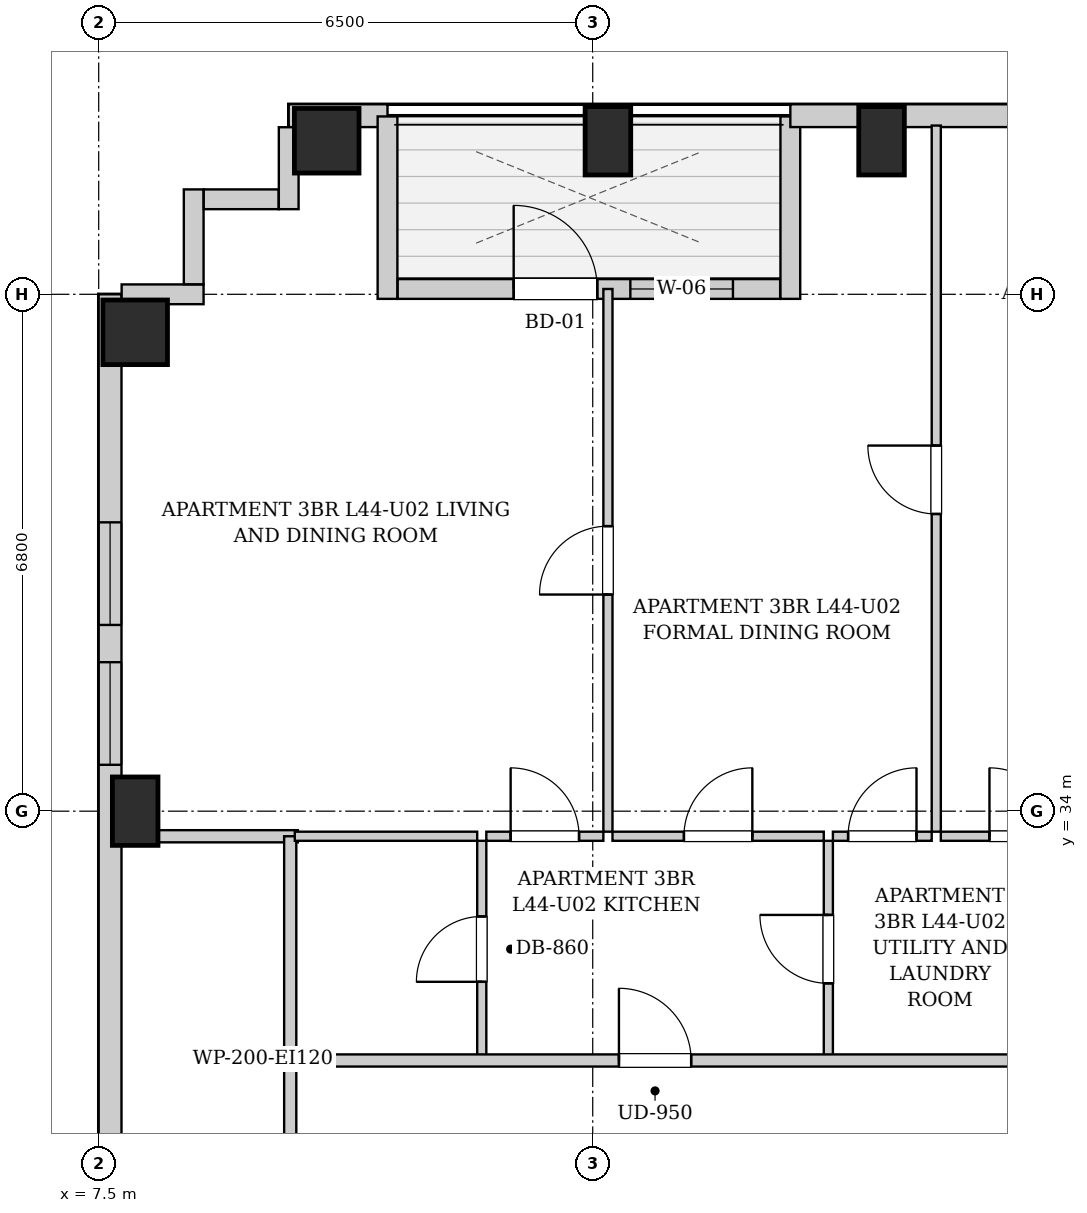
"""IFC4 building model, lengths in metres.
Left out: names, types, materials, properties, quantities, classifications, styles, units other than length and angle.
Written with IfcOpenShell. Run it as: python <this file> out.ifc"""

import sys

from ifc_helpers import new_model, si_unit, direction, frame, frame_2d, origin, origin_2d, place, context, subcontext, project, spatial, rectangle, extrude, element, fill, save


model = new_model("IFC4")
c1 = context("Model", 3, precision=1e-05, world=origin(), true_north=direction((0.0, 1.0)))
c2 = subcontext(c1, "Body", "Model", "MODEL_VIEW")
j1 = project(units=[si_unit("LENGTHUNIT", "METRE"), si_unit("PLANEANGLEUNIT", "RADIAN")], contexts=[c1])
p1 = place(None, origin())
s1 = spatial("IfcSite", under=j1, at=p1, CompositionType="ELEMENT")
p2 = place(p1, origin())
s2 = spatial("IfcBuilding", under=s1, at=p2, CompositionType="ELEMENT")
p3 = place(p2, frame((0.0, 0.0, 153.65)))
s3 = spatial("IfcBuildingStorey", under=s2, at=p3, CompositionType="ELEMENT", Elevation=153.65)
p4 = place(p3, frame((10.5, 42.82, 0.0), z_axis=(0.0, 0.0, 1.0), x_axis=(1.0, 0.0, 0.0)))
e1 = element("IfcColumn", 1, at=p4, inside=s3, PredefinedType="COLUMN", context=c2, shape_type="SweptSolid", body=[
    extrude(rectangle(XDim=0.85, YDim=0.85, at=origin_2d()), origin(), (0.0, 0.0, 1.0), 3.25),
])
for number, where, z_axis, x_axis in (
    (2, (14.2, 42.82, 0.0), (0.0, 0.0, 1.0), (1.0, 0.0, 0.0)),
    (3, (17.8, 42.82, 0.0), (0.0, 0.0, 1.0), (1.0, 0.0, 0.0)),
    (4, (7.98, 34.0, 0.0), (0.0, 0.0, 1.0), (1.0, 0.0, 0.0)),
):
    element("IfcColumn", number, at=place(p3, frame(where, z_axis=z_axis, x_axis=x_axis)), inside=s3, PredefinedType="COLUMN", context=c2, shape_type="SweptSolid", body=[
        extrude(rectangle(XDim=0.6, YDim=0.9, at=origin_2d()), origin(), (0.0, 0.0, 1.0), 3.25),
    ])
p5 = place(p3, frame((7.98, 40.3, 0.0), z_axis=(0.0, 0.0, 1.0), x_axis=(1.0, 0.0, 0.0)))
e5 = element("IfcColumn", 5, at=p5, inside=s3, PredefinedType="COLUMN", context=c2, shape_type="SweptSolid", body=[
    extrude(rectangle(XDim=0.85, YDim=0.85, at=origin_2d()), origin(), (0.0, 0.0, 1.0), 3.25),
])
p6 = place(p3, frame((10.0, 43.15, 0.0), z_axis=(0.0, 0.0, 1.0), x_axis=(1.0, 0.0, 0.0)))
e6 = element("IfcWall", 6, at=p6, inside=s3, PredefinedType="SOLIDWALL", context=c2, shape_type="SweptSolid", body=[
    extrude(rectangle(XDim=1.3, YDim=0.3, at=frame_2d((0.65, 0.0))), origin(), (0.0, 0.0, 1.0), 2.99),
])
p7 = place(p3, frame((11.3, 43.14, 0.0), z_axis=(0.0, 0.0, 1.0), x_axis=(0.0, -1.0, 0.0)))
e7 = element("IfcWall", 7, at=p7, inside=s3, PredefinedType="SOLIDWALL", context=c2, shape_type="SweptSolid", body=[
    extrude(rectangle(XDim=2.4, YDim=0.26, at=frame_2d((1.2, 0.0))), origin(), (0.0, 0.0, 1.0), 2.99),
])
p8 = place(p3, frame((11.434, 40.87, 0.0), z_axis=(0.0, 0.0, 1.0), x_axis=(1.0, 0.0, 0.0)))
e8 = element("IfcWall", 8, at=p8, inside=s3, PredefinedType="SOLIDWALL", context=c2, shape_type="SweptSolid", body=[
    extrude(rectangle(XDim=5.032, YDim=0.26, at=frame_2d((2.516, 0.0))), origin(), (0.0, 0.0, 1.0), 2.99),
])
p9 = place(p8, frame((1.526, 0.0, 0.0)))
e9 = element("IfcOpeningElement", 9, at=p9, cuts=e8, PredefinedType="OPENING", context=c2, shape_type="SweptSolid", body=[
    extrude(rectangle(XDim=1.1, YDim=2.0, at=frame_2d((0.55, 1.0))), frame((0.0, 0.14, 0.0), z_axis=(0.0, -1.0, 0.0), x_axis=(1.0, 0.0, 0.0)), (0.0, 0.0, 1.0), 0.28),
])
p10 = place(p8, frame((3.061, 0.0, 0.85)))
e10 = element("IfcOpeningElement", 10, at=p10, cuts=e8, PredefinedType="OPENING", context=c2, shape_type="SweptSolid", body=[
    extrude(rectangle(XDim=1.35, YDim=1.65, at=frame_2d((0.675, 0.825))), frame((0.0, 0.14, 0.0), z_axis=(0.0, -1.0, 0.0), x_axis=(1.0, 0.0, 0.0)), (0.0, 0.0, 1.0), 0.28),
])
p11 = place(p3, frame((16.6, 40.74, 0.0), z_axis=(0.0, 0.0, 1.0), x_axis=(0.0, 1.0, 0.0)))
e11 = element("IfcWall", 11, at=p11, inside=s3, PredefinedType="SOLIDWALL", context=c2, shape_type="SweptSolid", body=[
    extrude(rectangle(XDim=2.4, YDim=0.26, at=frame_2d((1.2, 0.0))), origin(), (0.0, 0.0, 1.0), 2.99),
])
p12 = place(p3, frame((16.6, 43.15, 0.0), z_axis=(0.0, 0.0, 1.0), x_axis=(1.0, 0.0, 0.0)))
e12 = element("IfcWall", 12, at=p12, inside=s3, PredefinedType="SOLIDWALL", context=c2, shape_type="SweptSolid", body=[
    extrude(rectangle(XDim=13.35, YDim=0.3, at=frame_2d((6.675, 0.0))), origin(), (0.0, 0.0, 1.0), 2.99),
])
p13 = place(p12, frame((3.269, 0.0, 0.55)))
e13 = element("IfcOpeningElement", 13, at=p13, cuts=e12, PredefinedType="OPENING", context=c2, shape_type="SweptSolid", body=[
    extrude(rectangle(XDim=1.35, YDim=1.2, at=frame_2d((0.675, 0.6))), frame((0.0, 0.16, 0.0), z_axis=(0.0, -1.0, 0.0), x_axis=(1.0, 0.0, 0.0)), (0.0, 0.0, 1.0), 0.32),
])
p14 = place(p12, frame((10.93, 0.0, 0.55)))
e14 = element("IfcOpeningElement", 14, at=p14, cuts=e12, PredefinedType="OPENING", context=c2, shape_type="SweptSolid", body=[
    extrude(rectangle(XDim=1.35, YDim=1.2, at=frame_2d((0.675, 0.6))), frame((0.0, 0.16, 0.0), z_axis=(0.0, -1.0, 0.0), x_axis=(1.0, 0.0, 0.0)), (0.0, 0.0, 1.0), 0.32),
])
p15 = place(p3, frame((7.65, 6.3, 0.0), z_axis=(0.0, 0.0, 1.0), x_axis=(0.0, 1.0, 0.0)))
e15 = element("IfcWall", 15, at=p15, inside=s3, PredefinedType="SOLIDWALL", context=c2, shape_type="SweptSolid", body=[
    extrude(rectangle(XDim=34.5, YDim=0.3, at=frame_2d((17.25, 0.0))), origin(), (0.0, 0.0, 1.0), 2.99),
])
p16 = place(p15, frame((1.425, 0.0, 0.55)))
e16 = element("IfcOpeningElement", 16, at=p16, cuts=e15, PredefinedType="OPENING", context=c2, shape_type="SweptSolid", body=[
    extrude(rectangle(XDim=1.35, YDim=1.2, at=frame_2d((0.675, 0.6))), frame((0.0, 0.16, 0.0), z_axis=(0.0, -1.0, 0.0), x_axis=(1.0, 0.0, 0.0)), (0.0, 0.0, 1.0), 0.32),
])
p17 = place(p15, frame((30.15, 0.0, 0.55)))
e17 = element("IfcOpeningElement", 17, at=p17, cuts=e15, PredefinedType="OPENING", context=c2, shape_type="SweptSolid", body=[
    extrude(rectangle(XDim=1.35, YDim=1.2, at=frame_2d((0.675, 0.6))), frame((0.0, 0.16, 0.0), z_axis=(0.0, -1.0, 0.0), x_axis=(1.0, 0.0, 0.0)), (0.0, 0.0, 1.0), 0.32),
])
p18 = place(p15, frame((28.31, 0.0, 0.55)))
e18 = element("IfcOpeningElement", 18, at=p18, cuts=e15, PredefinedType="OPENING", context=c2, shape_type="SweptSolid", body=[
    extrude(rectangle(XDim=1.35, YDim=1.2, at=frame_2d((0.675, 0.6))), frame((0.0, 0.16, 0.0), z_axis=(0.0, -1.0, 0.0), x_axis=(1.0, 0.0, 0.0)), (0.0, 0.0, 1.0), 0.32),
])
p19 = place(p15, frame((10.35, 0.0, 0.55)))
e19 = element("IfcOpeningElement", 19, at=p19, cuts=e15, PredefinedType="OPENING", context=c2, shape_type="SweptSolid", body=[
    extrude(rectangle(XDim=1.35, YDim=1.2, at=frame_2d((0.675, 0.6))), frame((0.0, 0.16, 0.0), z_axis=(0.0, -1.0, 0.0), x_axis=(1.0, 0.0, 0.0)), (0.0, 0.0, 1.0), 0.32),
])
p20 = place(p15, frame((19.725, 0.0, 0.55)))
e20 = element("IfcOpeningElement", 20, at=p20, cuts=e15, PredefinedType="OPENING", context=c2, shape_type="SweptSolid", body=[
    extrude(rectangle(XDim=1.35, YDim=1.2, at=frame_2d((0.675, 0.6))), frame((0.0, 0.16, 0.0), z_axis=(0.0, -1.0, 0.0), x_axis=(1.0, 0.0, 0.0)), (0.0, 0.0, 1.0), 0.32),
])
p21 = place(p3, frame((7.802, 40.8, 0.0), z_axis=(0.0, 0.0, 1.0), x_axis=(1.0, 0.0, 0.0)))
e21 = element("IfcWall", 21, at=p21, inside=s3, PredefinedType="SOLIDWALL", context=c2, shape_type="SweptSolid", body=[
    extrude(rectangle(XDim=1.078, YDim=0.26, at=frame_2d((0.539, 0.0))), origin(), (0.0, 0.0, 1.0), 2.99),
])
p22 = place(p3, frame((8.75, 40.932, 0.0), z_axis=(0.0, 0.0, 1.0), x_axis=(0.0, 1.0, 0.0)))
e22 = element("IfcWall", 22, at=p22, inside=s3, PredefinedType="SOLIDWALL", context=c2, shape_type="SweptSolid", body=[
    extrude(rectangle(XDim=1.248, YDim=0.26, at=frame_2d((0.624, 0.0))), origin(), (0.0, 0.0, 1.0), 2.99),
])
p23 = place(p3, frame((8.882, 42.05, 0.0), z_axis=(0.0, 0.0, 1.0), x_axis=(1.0, 0.0, 0.0)))
e23 = element("IfcWall", 23, at=p23, inside=s3, PredefinedType="SOLIDWALL", context=c2, shape_type="SweptSolid", body=[
    extrude(rectangle(XDim=0.986, YDim=0.26, at=frame_2d((0.493, 0.0))), origin(), (0.0, 0.0, 1.0), 2.99),
])
p24 = place(p3, frame((10.0, 41.92, 0.0), z_axis=(0.0, 0.0, 1.0), x_axis=(0.0, 1.0, 0.0)))
e24 = element("IfcWall", 24, at=p24, inside=s3, PredefinedType="SOLIDWALL", context=c2, shape_type="SweptSolid", body=[
    extrude(rectangle(XDim=1.078, YDim=0.26, at=frame_2d((0.539, 0.0))), origin(), (0.0, 0.0, 1.0), 2.99),
])
p25 = place(p3, frame((10.02, 28.98, 0.0), z_axis=(0.0, 0.0, 1.0), x_axis=(0.0, 1.0, 0.0)))
e25 = element("IfcWall", 25, at=p25, inside=s3, PredefinedType="PARTITIONING", context=c2, shape_type="SweptSolid", body=[
    extrude(rectangle(XDim=1.74, YDim=0.16, at=frame_2d((0.87, 0.0))), origin(), (0.0, 0.0, 1.0), 2.99),
])
p26 = place(p3, frame((7.78, 33.67, 0.0), z_axis=(0.0, 0.0, 1.0), x_axis=(1.0, 0.0, 0.0)))
e26 = element("IfcWall", 26, at=p26, inside=s3, PredefinedType="PARTITIONING", context=c2, shape_type="SweptSolid", body=[
    extrude(rectangle(XDim=2.34, YDim=0.16, at=frame_2d((1.17, 0.0))), origin(), (0.0, 0.0, 1.0), 2.99),
])
p27 = place(p3, frame((10.02, 30.76, 0.0), z_axis=(0.0, 0.0, 1.0), x_axis=(0.0, 1.0, 0.0)))
e27 = element("IfcWall", 27, at=p27, inside=s3, PredefinedType="PARTITIONING", context=c2, shape_type="SweptSolid", body=[
    extrude(rectangle(XDim=2.91, YDim=0.16, at=frame_2d((1.455, 0.0))), origin(), (0.0, 0.0, 1.0), 2.99),
])
p28 = place(p3, frame((12.54, 30.76, 0.0), z_axis=(0.0, 0.0, 1.0), x_axis=(0.0, 1.0, 0.0)))
e28 = element("IfcWall", 28, at=p28, inside=s3, PredefinedType="PARTITIONING", context=c2, shape_type="SweptSolid", body=[
    extrude(rectangle(XDim=2.85, YDim=0.12, at=frame_2d((1.425, 0.0))), origin(), (0.0, 0.0, 1.0), 2.99),
])
p29 = place(p28, frame((0.995, 0.0, 0.0)))
e29 = element("IfcOpeningElement", 29, at=p29, cuts=e28, PredefinedType="OPENING", context=c2, shape_type="SweptSolid", body=[
    extrude(rectangle(XDim=0.86, YDim=2.05, at=frame_2d((0.43, 1.025))), frame((0.0, 0.07, 0.0), z_axis=(0.0, -1.0, 0.0), x_axis=(1.0, 0.0, 0.0)), (0.0, 0.0, 1.0), 0.14),
])
p30 = place(p3, frame((10.08, 33.67, 0.0), z_axis=(0.0, 0.0, 1.0), x_axis=(1.0, 0.0, 0.0)))
e30 = element("IfcWall", 30, at=p30, inside=s3, PredefinedType="PARTITIONING", context=c2, shape_type="SweptSolid", body=[
    extrude(rectangle(XDim=2.4, YDim=0.12, at=frame_2d((1.2, 0.0))), origin(), (0.0, 0.0, 1.0), 2.99),
])
p31 = place(p3, frame((17.1, 30.76, 0.0), z_axis=(0.0, 0.0, 1.0), x_axis=(0.0, 1.0, 0.0)))
e31 = element("IfcWall", 31, at=p31, inside=s3, PredefinedType="PARTITIONING", context=c2, shape_type="SweptSolid", body=[
    extrude(rectangle(XDim=2.85, YDim=0.12, at=frame_2d((1.425, 0.0))), origin(), (0.0, 0.0, 1.0), 2.99),
])
p32 = place(p31, frame((0.975, 0.0, 0.0)))
e32 = element("IfcOpeningElement", 32, at=p32, cuts=e31, PredefinedType="OPENING", context=c2, shape_type="SweptSolid", body=[
    extrude(rectangle(XDim=0.9, YDim=2.05, at=frame_2d((0.45, 1.025))), frame((0.0, 0.07, 0.0), z_axis=(0.0, -1.0, 0.0), x_axis=(1.0, 0.0, 0.0)), (0.0, 0.0, 1.0), 0.14),
])
p33 = place(p3, frame((12.6, 33.67, 0.0), z_axis=(0.0, 0.0, 1.0), x_axis=(1.0, 0.0, 0.0)))
e33 = element("IfcWall", 33, at=p33, inside=s3, PredefinedType="PARTITIONING", context=c2, shape_type="SweptSolid", body=[
    extrude(rectangle(XDim=1.54, YDim=0.12, at=frame_2d((0.77, 0.0))), origin(), (0.0, 0.0, 1.0), 2.99),
])
p34 = place(p33, frame((0.32, 0.0, 0.0)))
e34 = element("IfcOpeningElement", 34, at=p34, cuts=e33, PredefinedType="OPENING", context=c2, shape_type="SweptSolid", body=[
    extrude(rectangle(XDim=0.9, YDim=2.05, at=frame_2d((0.45, 1.025))), frame((0.0, 0.07, 0.0), z_axis=(0.0, -1.0, 0.0), x_axis=(1.0, 0.0, 0.0)), (0.0, 0.0, 1.0), 0.14),
])
p35 = place(p3, frame((14.26, 33.67, 0.0), z_axis=(0.0, 0.0, 1.0), x_axis=(1.0, 0.0, 0.0)))
e35 = element("IfcWall", 35, at=p35, inside=s3, PredefinedType="PARTITIONING", context=c2, shape_type="SweptSolid", body=[
    extrude(rectangle(XDim=2.78, YDim=0.12, at=frame_2d((1.39, 0.0))), origin(), (0.0, 0.0, 1.0), 2.99),
])
p36 = place(p35, frame((0.94, 0.0, 0.0)))
e36 = element("IfcOpeningElement", 36, at=p36, cuts=e35, PredefinedType="OPENING", context=c2, shape_type="SweptSolid", body=[
    extrude(rectangle(XDim=0.9, YDim=2.05, at=frame_2d((0.45, 1.025))), frame((0.0, 0.07, 0.0), z_axis=(0.0, -1.0, 0.0), x_axis=(1.0, 0.0, 0.0)), (0.0, 0.0, 1.0), 0.14),
])
p37 = place(p3, frame((17.16, 33.67, 0.0), z_axis=(0.0, 0.0, 1.0), x_axis=(1.0, 0.0, 0.0)))
e37 = element("IfcWall", 37, at=p37, inside=s3, PredefinedType="PARTITIONING", context=c2, shape_type="SweptSolid", body=[
    extrude(rectangle(XDim=1.3, YDim=0.12, at=frame_2d((0.65, 0.0))), origin(), (0.0, 0.0, 1.0), 2.99),
])
p38 = place(p37, frame((0.2, 0.0, 0.0)))
e38 = element("IfcOpeningElement", 38, at=p38, cuts=e37, PredefinedType="OPENING", context=c2, shape_type="SweptSolid", body=[
    extrude(rectangle(XDim=0.9, YDim=2.05, at=frame_2d((0.45, 1.025))), frame((0.0, 0.07, 0.0), z_axis=(0.0, -1.0, 0.0), x_axis=(1.0, 0.0, 0.0)), (0.0, 0.0, 1.0), 0.14),
])
p39 = place(p3, frame((18.58, 33.67, 0.0), z_axis=(0.0, 0.0, 1.0), x_axis=(1.0, 0.0, 0.0)))
e39 = element("IfcWall", 39, at=p39, inside=s3, PredefinedType="PARTITIONING", context=c2, shape_type="SweptSolid", body=[
    extrude(rectangle(XDim=2.18, YDim=0.12, at=frame_2d((1.09, 0.0))), origin(), (0.0, 0.0, 1.0), 2.99),
])
p40 = place(p39, frame((0.64, 0.0, 0.0)))
e40 = element("IfcOpeningElement", 40, at=p40, cuts=e39, PredefinedType="OPENING", context=c2, shape_type="SweptSolid", body=[
    extrude(rectangle(XDim=0.9, YDim=2.05, at=frame_2d((0.45, 1.025))), frame((0.0, 0.07, 0.0), z_axis=(0.0, -1.0, 0.0), x_axis=(1.0, 0.0, 0.0)), (0.0, 0.0, 1.0), 0.14),
])
p41 = place(p3, frame((14.2, 33.73, 0.0), z_axis=(0.0, 0.0, 1.0), x_axis=(0.0, 1.0, 0.0)))
e41 = element("IfcWall", 41, at=p41, inside=s3, PredefinedType="PARTITIONING", context=c2, shape_type="SweptSolid", body=[
    extrude(rectangle(XDim=7.14, YDim=0.12, at=frame_2d((3.57, 0.0))), origin(), (0.0, 0.0, 1.0), 2.99),
])
p42 = place(p41, frame((3.12, 0.0, 0.0)))
e42 = element("IfcOpeningElement", 42, at=p42, cuts=e41, PredefinedType="OPENING", context=c2, shape_type="SweptSolid", body=[
    extrude(rectangle(XDim=0.9, YDim=2.05, at=frame_2d((0.45, 1.025))), frame((0.0, 0.07, 0.0), z_axis=(0.0, -1.0, 0.0), x_axis=(1.0, 0.0, 0.0)), (0.0, 0.0, 1.0), 0.14),
])
p43 = place(p3, frame((18.52, 33.73, 0.0), z_axis=(0.0, 0.0, 1.0), x_axis=(0.0, 1.0, 0.0)))
e43 = element("IfcWall", 43, at=p43, inside=s3, PredefinedType="PARTITIONING", context=c2, shape_type="SweptSolid", body=[
    extrude(rectangle(XDim=9.29, YDim=0.12, at=frame_2d((4.645, 0.0))), origin(), (0.0, 0.0, 1.0), 2.99),
])
p44 = place(p43, frame((4.18, 0.0, 0.0)))
e44 = element("IfcOpeningElement", 44, at=p44, cuts=e43, PredefinedType="OPENING", context=c2, shape_type="SweptSolid", body=[
    extrude(rectangle(XDim=0.9, YDim=2.05, at=frame_2d((0.45, 1.025))), frame((0.0, 0.07, 0.0), z_axis=(0.0, -1.0, 0.0), x_axis=(1.0, 0.0, 0.0)), (0.0, 0.0, 1.0), 0.14),
])
p45 = place(p3, frame((10.05, 30.72, 0.0), z_axis=(0.0, 0.0, 1.0), x_axis=(1.0, 0.0, 0.0)))
e45 = element("IfcWall", 45, at=p45, inside=s3, PredefinedType="PARTITIONING", context=c2, shape_type="SweptSolid", body=[
    extrude(rectangle(XDim=27.7, YDim=0.16, at=frame_2d((13.85, 0.0))), origin(), (0.0, 0.0, 1.0), 2.99),
])
p46 = place(p45, frame((4.295, 0.0, 0.0)))
e46 = element("IfcOpeningElement", 46, at=p46, cuts=e45, PredefinedType="OPENING", context=c2, shape_type="SweptSolid", body=[
    extrude(rectangle(XDim=0.95, YDim=2.1, at=frame_2d((0.475, 1.05))), frame((0.0, 0.09, 0.0), z_axis=(0.0, -1.0, 0.0), x_axis=(1.0, 0.0, 0.0)), (0.0, 0.0, 1.0), 0.18),
])
p47 = place(p29, origin())
e47 = element("IfcDoor", 47, at=p47, inside=s3, OperationType="SINGLE_SWING_LEFT", PredefinedType="DOOR", context=c2, shape_type="SweptSolid", body=[
    extrude(rectangle(XDim=0.86, YDim=2.05, at=frame_2d((0.43, 1.025))), frame((0.0, 0.025, 0.0), z_axis=(0.0, -1.0, 0.0), x_axis=(1.0, 0.0, 0.0)), (0.0, 0.0, 1.0), 0.05),
])
fill(e29, e47)
p48 = place(p32, origin())
e48 = element("IfcDoor", 48, at=p48, inside=s3, OperationType="SINGLE_SWING_RIGHT", PredefinedType="DOOR", context=c2, shape_type="SweptSolid", body=[
    extrude(rectangle(XDim=0.9, YDim=2.05, at=frame_2d((0.45, 1.025))), frame((0.0, 0.025, 0.0), z_axis=(0.0, -1.0, 0.0), x_axis=(1.0, 0.0, 0.0)), (0.0, 0.0, 1.0), 0.05),
])
fill(e32, e48)
p49 = place(p34, origin())
e49 = element("IfcDoor", 49, at=p49, inside=s3, OperationType="SINGLE_SWING_LEFT", PredefinedType="DOOR", context=c2, shape_type="SweptSolid", body=[
    extrude(rectangle(XDim=0.9, YDim=2.05, at=frame_2d((0.45, 1.025))), frame((0.0, 0.025, 0.0), z_axis=(0.0, -1.0, 0.0), x_axis=(1.0, 0.0, 0.0)), (0.0, 0.0, 1.0), 0.05),
])
fill(e34, e49)
p50 = place(p36, origin())
e50 = element("IfcDoor", 50, at=p50, inside=s3, OperationType="SINGLE_SWING_RIGHT", PredefinedType="DOOR", context=c2, shape_type="SweptSolid", body=[
    extrude(rectangle(XDim=0.9, YDim=2.05, at=frame_2d((0.45, 1.025))), frame((0.0, 0.025, 0.0), z_axis=(0.0, -1.0, 0.0), x_axis=(1.0, 0.0, 0.0)), (0.0, 0.0, 1.0), 0.05),
])
fill(e36, e50)
p51 = place(p38, origin())
e51 = element("IfcDoor", 51, at=p51, inside=s3, OperationType="SINGLE_SWING_RIGHT", PredefinedType="DOOR", context=c2, shape_type="SweptSolid", body=[
    extrude(rectangle(XDim=0.9, YDim=2.05, at=frame_2d((0.45, 1.025))), frame((0.0, 0.025, 0.0), z_axis=(0.0, -1.0, 0.0), x_axis=(1.0, 0.0, 0.0)), (0.0, 0.0, 1.0), 0.05),
])
fill(e38, e51)
p52 = place(p40, origin())
e52 = element("IfcDoor", 52, at=p52, inside=s3, OperationType="SINGLE_SWING_LEFT", PredefinedType="DOOR", context=c2, shape_type="SweptSolid", body=[
    extrude(rectangle(XDim=0.9, YDim=2.05, at=frame_2d((0.45, 1.025))), frame((0.0, 0.025, 0.0), z_axis=(0.0, -1.0, 0.0), x_axis=(1.0, 0.0, 0.0)), (0.0, 0.0, 1.0), 0.05),
])
fill(e40, e52)
p53 = place(p42, origin())
e53 = element("IfcDoor", 53, at=p53, inside=s3, OperationType="SINGLE_SWING_LEFT", PredefinedType="DOOR", context=c2, shape_type="SweptSolid", body=[
    extrude(rectangle(XDim=0.9, YDim=2.05, at=frame_2d((0.45, 1.025))), frame((0.0, 0.025, 0.0), z_axis=(0.0, -1.0, 0.0), x_axis=(1.0, 0.0, 0.0)), (0.0, 0.0, 1.0), 0.05),
])
fill(e42, e53)
p54 = place(p44, origin())
e54 = element("IfcDoor", 54, at=p54, inside=s3, OperationType="SINGLE_SWING_RIGHT", PredefinedType="DOOR", context=c2, shape_type="SweptSolid", body=[
    extrude(rectangle(XDim=0.9, YDim=2.05, at=frame_2d((0.45, 1.025))), frame((0.0, 0.025, 0.0), z_axis=(0.0, -1.0, 0.0), x_axis=(1.0, 0.0, 0.0)), (0.0, 0.0, 1.0), 0.05),
])
fill(e44, e54)
p55 = place(p46, origin())
e55 = element("IfcDoor", 55, at=p55, inside=s3, OperationType="SINGLE_SWING_LEFT", PredefinedType="DOOR", context=c2, shape_type="SweptSolid", body=[
    extrude(rectangle(XDim=0.95, YDim=2.1, at=frame_2d((0.475, 1.05))), frame((0.0, 0.025, 0.0), z_axis=(0.0, -1.0, 0.0), x_axis=(1.0, 0.0, 0.0)), (0.0, 0.0, 1.0), 0.05),
])
fill(e46, e55)
p56 = place(p9, origin())
e56 = element("IfcDoor", 56, at=p56, inside=s3, OperationType="SINGLE_SWING_LEFT", PredefinedType="DOOR", context=c2, shape_type="SweptSolid", body=[
    extrude(rectangle(XDim=1.1, YDim=2.0, at=frame_2d((0.55, 1.0))), frame((0.0, 0.025, 0.0), z_axis=(0.0, -1.0, 0.0), x_axis=(1.0, 0.0, 0.0)), (0.0, 0.0, 1.0), 0.05),
])
fill(e9, e56)
p57 = place(p17, origin())
e57 = element("IfcWindow", 57, at=p57, inside=s3, PartitioningType="SINGLE_PANEL", PredefinedType="WINDOW", context=c2, shape_type="SweptSolid", body=[
    extrude(rectangle(XDim=1.35, YDim=1.2, at=frame_2d((0.675, 0.6))), frame((0.0, 0.03, 0.0), z_axis=(0.0, -1.0, 0.0), x_axis=(1.0, 0.0, 0.0)), (0.0, 0.0, 1.0), 0.06),
])
fill(e17, e57)
p58 = place(p18, origin())
e58 = element("IfcWindow", 58, at=p58, inside=s3, PartitioningType="SINGLE_PANEL", PredefinedType="WINDOW", context=c2, shape_type="SweptSolid", body=[
    extrude(rectangle(XDim=1.35, YDim=1.2, at=frame_2d((0.675, 0.6))), frame((0.0, 0.03, 0.0), z_axis=(0.0, -1.0, 0.0), x_axis=(1.0, 0.0, 0.0)), (0.0, 0.0, 1.0), 0.06),
])
fill(e18, e58)
p59 = place(p10, origin())
e59 = element("IfcWindow", 59, at=p59, inside=s3, PartitioningType="SINGLE_PANEL", PredefinedType="WINDOW", context=c2, shape_type="SweptSolid", body=[
    extrude(rectangle(XDim=1.35, YDim=1.65, at=frame_2d((0.675, 0.825))), frame((0.0, 0.03, 0.0), z_axis=(0.0, -1.0, 0.0), x_axis=(1.0, 0.0, 0.0)), (0.0, 0.0, 1.0), 0.06),
])
fill(e10, e59)
save(model, sys.argv[1])
